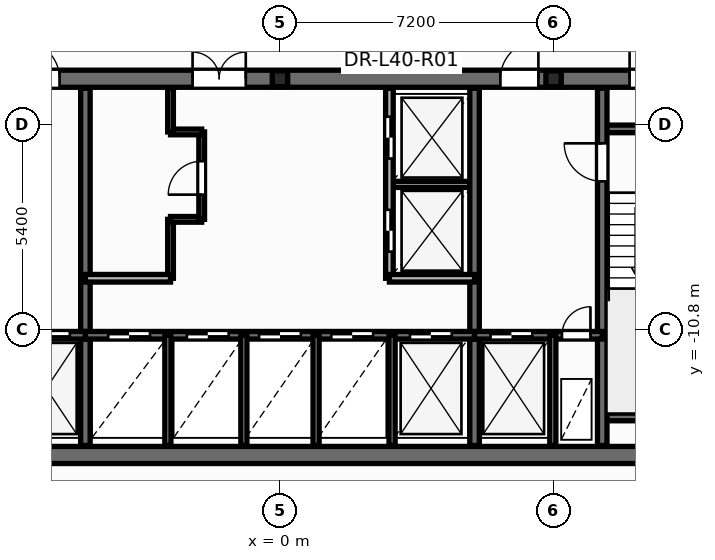
"""IFC4 building model, lengths in metres.
Left out: names, types, materials, properties, quantities, classifications, styles, units other than length and angle.
Written with IfcOpenShell. Run it as: python <this file> out.ifc"""

import sys

from ifc_helpers import new_model, si_unit, direction, frame, frame_2d, origin, origin_2d, place, context, subcontext, project, spatial, rectangle, i_section, extrude, element, fill, save


model = new_model("IFC4")
c1 = context("Model", 3, precision=1e-05, world=origin(), true_north=direction((0.0, 1.0)))
c2 = subcontext(c1, "Body", "Model", "MODEL_VIEW")
j1 = project(units=[si_unit("LENGTHUNIT", "METRE"), si_unit("PLANEANGLEUNIT", "RADIAN")], contexts=[c1])
p1 = place(None, origin())
s1 = spatial("IfcSite", under=j1, at=p1, CompositionType="ELEMENT")
p2 = place(p1, origin())
s2 = spatial("IfcBuilding", under=s1, at=p2, CompositionType="ELEMENT")
p3 = place(p2, frame((0.0, 0.0, 154.5)))
s3 = spatial("IfcBuildingStorey", under=s2, at=p3, CompositionType="ELEMENT", Elevation=154.5)
for number, where, z_axis, x_axis in (
    (1, (0.0, -4.2, 0.0), (0.0, 0.0, 1.0), (1.0, 0.0, 0.0)),
    (2, (7.2, -4.2, 0.0), (0.0, 0.0, 1.0), (1.0, 0.0, 0.0)),
):
    element("IfcColumn", number, at=place(p3, frame(where, z_axis=z_axis, x_axis=x_axis)), inside=s3, PredefinedType="PILASTER", context=c2, shape_type="SweptSolid", body=[
        extrude(i_section(OverallWidth=0.405, OverallDepth=0.414, WebThickness=0.022, FlangeThickness=0.032, at=origin_2d()), origin(), (0.0, 0.0, 1.0), 3.6),
    ])
p4 = place(p3, frame((-2.88, -9.45, 0.0), z_axis=(0.0, 0.0, 1.0), x_axis=(0.0, 1.0, 0.0)))
e3 = element("IfcWall", 3, at=p4, inside=s3, PredefinedType="PARTITIONING", context=c2, shape_type="SweptSolid", body=[
    extrude(rectangle(XDim=1.55, YDim=0.15, at=frame_2d((0.775, 0.0))), origin(), (0.0, 0.0, 1.0), 3.35),
])
p5 = place(p3, frame((-2.88, -7.9, 0.0), z_axis=(0.0, 0.0, 1.0), x_axis=(1.0, 0.0, 0.0)))
e4 = element("IfcWall", 4, at=p5, inside=s3, PredefinedType="PARTITIONING", context=c2, shape_type="SweptSolid", body=[
    extrude(rectangle(XDim=0.82, YDim=0.15, at=frame_2d((0.41, 0.0))), origin(), (0.0, 0.0, 1.0), 3.35),
])
p6 = place(p3, frame((-2.06, -7.9, 0.0), z_axis=(0.0, 0.0, 1.0), x_axis=(0.0, 1.0, 0.0)))
e5 = element("IfcWall", 5, at=p6, inside=s3, PredefinedType="PARTITIONING", context=c2, shape_type="SweptSolid", body=[
    extrude(rectangle(XDim=2.3, YDim=0.15, at=frame_2d((1.15, 0.0))), origin(), (0.0, 0.0, 1.0), 3.35),
])
p7 = place(p6, frame((0.65, 0.0, 0.0)))
e6 = element("IfcOpeningElement", 6, at=p7, cuts=e5, PredefinedType="OPENING", context=c2, shape_type="SweptSolid", body=[
    extrude(rectangle(XDim=0.886, YDim=2.104, at=frame_2d((0.44, 1.052))), frame((0.0, 0.085, 0.0), z_axis=(0.0, -1.0, 0.0), x_axis=(1.0, 0.0, 0.0)), (0.0, 0.0, 1.0), 0.17),
])
p8 = place(p3, frame((-2.88, -5.6, 0.0), z_axis=(0.0, 0.0, 1.0), x_axis=(1.0, 0.0, 0.0)))
e7 = element("IfcWall", 7, at=p8, inside=s3, PredefinedType="PARTITIONING", context=c2, shape_type="SweptSolid", body=[
    extrude(rectangle(XDim=0.82, YDim=0.15, at=frame_2d((0.41, 0.0))), origin(), (0.0, 0.0, 1.0), 3.35),
])
p9 = place(p3, frame((-2.88, -5.6, 0.0), z_axis=(0.0, 0.0, 1.0), x_axis=(0.0, 1.0, 0.0)))
e8 = element("IfcWall", 8, at=p9, inside=s3, PredefinedType="PARTITIONING", context=c2, shape_type="SweptSolid", body=[
    extrude(rectangle(XDim=1.15, YDim=0.15, at=frame_2d((0.575, 0.0))), origin(), (0.0, 0.0, 1.0), 3.35),
])
p10 = place(p3, frame((2.88, -6.98, 0.0), z_axis=(0.0, 0.0, 1.0), x_axis=(1.0, 0.0, 0.0)))
e9 = element("IfcWall", 9, at=p10, inside=s3, PredefinedType="PARTITIONING", context=c2, shape_type="SweptSolid", body=[
    extrude(rectangle(XDim=2.24, YDim=0.16, at=frame_2d((1.12, 0.0))), origin(), (0.0, 0.0, 1.0), 3.35),
])
p11 = place(p3, frame((-12.65, -14.1, 0.0), z_axis=(0.0, 0.0, 1.0), x_axis=(1.0, 0.0, 0.0)))
e10 = element("IfcWall", 10, at=p11, inside=s3, PredefinedType="SHEAR", context=c2, shape_type="SweptSolid", body=[
    extrude(rectangle(XDim=25.3, YDim=0.45, at=frame_2d((12.65, 0.0))), origin(), (0.0, 0.0, 1.0), 3.6),
])
p12 = place(p3, frame((-12.65, -4.2, 0.0), z_axis=(0.0, 0.0, 1.0), x_axis=(1.0, 0.0, 0.0)))
e11 = element("IfcWall", 11, at=p12, inside=s3, PredefinedType="SHEAR", context=c2, shape_type="SweptSolid", body=[
    extrude(rectangle(XDim=25.3, YDim=0.45, at=frame_2d((12.65, 0.0))), origin(), (0.0, 0.0, 1.0), 3.6),
])
p13 = place(p12, frame((1.85, 0.0, 0.0)))
e12 = element("IfcOpeningElement", 12, at=p13, cuts=e11, PredefinedType="OPENING", context=c2, shape_type="SweptSolid", body=[
    extrude(rectangle(XDim=0.756, YDim=2.054, at=frame_2d((0.375, 1.027))), frame((0.0, 0.235, 0.0), z_axis=(0.0, -1.0, 0.0), x_axis=(1.0, 0.0, 0.0)), (0.0, 0.0, 1.0), 0.47),
])
p14 = place(p12, frame((21.85, 0.0, 0.0)))
e13 = element("IfcOpeningElement", 13, at=p14, cuts=e11, PredefinedType="OPENING", context=c2, shape_type="SweptSolid", body=[
    extrude(rectangle(XDim=0.756, YDim=2.054, at=frame_2d((0.375, 1.027))), frame((0.0, 0.235, 0.0), z_axis=(0.0, -1.0, 0.0), x_axis=(1.0, 0.0, 0.0)), (0.0, 0.0, 1.0), 0.47),
])
p15 = place(p12, frame((23.5, 0.0, 0.0)))
e14 = element("IfcOpeningElement", 14, at=p15, cuts=e11, PredefinedType="OPENING", context=c2, shape_type="SweptSolid", body=[
    extrude(rectangle(XDim=0.756, YDim=2.054, at=frame_2d((0.375, 1.027))), frame((0.0, 0.235, 0.0), z_axis=(0.0, -1.0, 0.0), x_axis=(1.0, 0.0, 0.0)), (0.0, 0.0, 1.0), 0.47),
])
p16 = place(p12, frame((5.85, 0.0, 0.0)))
e15 = element("IfcOpeningElement", 15, at=p16, cuts=e11, PredefinedType="OPENING", context=c2, shape_type="SweptSolid", body=[
    extrude(rectangle(XDim=1.006, YDim=2.104, at=frame_2d((0.5, 1.052))), frame((0.0, 0.235, 0.0), z_axis=(0.0, -1.0, 0.0), x_axis=(1.0, 0.0, 0.0)), (0.0, 0.0, 1.0), 0.47),
])
p17 = place(p12, frame((10.35, 0.0, 0.0)))
e16 = element("IfcOpeningElement", 16, at=p17, cuts=e11, PredefinedType="OPENING", context=c2, shape_type="SweptSolid", body=[
    extrude(rectangle(XDim=1.406, YDim=2.154, at=frame_2d((0.7, 1.077))), frame((0.0, 0.235, 0.0), z_axis=(0.0, -1.0, 0.0), x_axis=(1.0, 0.0, 0.0)), (0.0, 0.0, 1.0), 0.47),
])
p18 = place(p12, frame((18.45, 0.0, 0.0)))
e17 = element("IfcOpeningElement", 17, at=p18, cuts=e11, PredefinedType="OPENING", context=c2, shape_type="SweptSolid", body=[
    extrude(rectangle(XDim=1.006, YDim=2.104, at=frame_2d((0.5, 1.052))), frame((0.0, 0.235, 0.0), z_axis=(0.0, -1.0, 0.0), x_axis=(1.0, 0.0, 0.0)), (0.0, 0.0, 1.0), 0.47),
])
for number, where, z_axis, x_axis in (
    (18, (8.48, -5.52, 0.0), (0.0, 0.0, 1.0), (1.0, 0.0, 0.0)),
    (19, (8.48, -13.1, 0.0), (0.0, 0.0, 1.0), (1.0, 0.0, 0.0)),
):
    element("IfcWall", number, at=place(p3, frame(where, z_axis=z_axis, x_axis=x_axis)), inside=s3, PredefinedType="SOLIDWALL", context=c2, shape_type="SweptSolid", body=[
        extrude(rectangle(XDim=3.87, YDim=0.2, at=frame_2d((1.935, 0.0))), origin(), (0.0, 0.0, 1.0), 3.6),
    ])
p19 = place(p3, frame((8.48, -13.85, 0.0), z_axis=(0.0, 0.0, 1.0), x_axis=(0.0, 1.0, 0.0)))
e20 = element("IfcWall", 20, at=p19, inside=s3, PredefinedType="SHEAR", context=c2, shape_type="SweptSolid", body=[
    extrude(rectangle(XDim=9.4, YDim=0.25, at=frame_2d((4.7, 0.0))), origin(), (0.0, 0.0, 1.0), 3.6),
])
p20 = place(p19, frame((6.95, 0.0, 0.0)))
e21 = element("IfcOpeningElement", 21, at=p20, cuts=e20, PredefinedType="OPENING", context=c2, shape_type="SweptSolid", body=[
    extrude(rectangle(XDim=1.006, YDim=2.104, at=frame_2d((0.5, 1.052))), frame((0.0, 0.135, 0.0), z_axis=(0.0, -1.0, 0.0), x_axis=(1.0, 0.0, 0.0)), (0.0, 0.0, 1.0), 0.27),
])
for number, where, z_axis, x_axis in (
    (22, (-5.12, -13.85, 0.0), (0.0, 0.0, 1.0), (0.0, 1.0, 0.0)),
    (23, (5.12, -13.85, 0.0), (0.0, 0.0, 1.0), (0.0, 1.0, 0.0)),
):
    element("IfcWall", number, at=place(p3, frame(where, z_axis=z_axis, x_axis=x_axis)), inside=s3, PredefinedType="SHEAR", context=c2, shape_type="SweptSolid", body=[
        extrude(rectangle(XDim=9.4, YDim=0.25, at=frame_2d((4.7, 0.0))), origin(), (0.0, 0.0, 1.0), 3.6),
    ])
p21 = place(p3, frame((-8.48, -10.95, 0.0), z_axis=(0.0, 0.0, 1.0), x_axis=(1.0, 0.0, 0.0)))
e24 = element("IfcWall", 24, at=p21, inside=s3, PredefinedType="SOLIDWALL", context=c2, shape_type="SweptSolid", body=[
    extrude(rectangle(XDim=3.36, YDim=0.2, at=frame_2d((1.68, 0.0))), origin(), (0.0, 0.0, 1.0), 3.6),
])
p22 = place(p21, frame((0.28, 0.0, 0.0)))
e25 = element("IfcOpeningElement", 25, at=p22, cuts=e24, PredefinedType="OPENING", context=c2, shape_type="SweptSolid", body=[
    extrude(rectangle(XDim=0.756, YDim=2.054, at=frame_2d((0.375, 1.027))), frame((0.0, 0.11, 0.0), z_axis=(0.0, -1.0, 0.0), x_axis=(1.0, 0.0, 0.0)), (0.0, 0.0, 1.0), 0.22),
])
p23 = place(p21, frame((1.85, 0.0, 0.0)))
e26 = element("IfcOpeningElement", 26, at=p23, cuts=e24, PredefinedType="OPENING", context=c2, shape_type="SweptSolid", body=[
    extrude(rectangle(XDim=1.106, YDim=2.104, at=frame_2d((0.55, 1.052))), frame((0.0, 0.11, 0.0), z_axis=(0.0, -1.0, 0.0), x_axis=(1.0, 0.0, 0.0)), (0.0, 0.0, 1.0), 0.22),
])
p24 = place(p3, frame((-5.12, -10.95, 0.0), z_axis=(0.0, 0.0, 1.0), x_axis=(1.0, 0.0, 0.0)))
e27 = element("IfcWall", 27, at=p24, inside=s3, PredefinedType="SOLIDWALL", context=c2, shape_type="SweptSolid", body=[
    extrude(rectangle(XDim=10.24, YDim=0.2, at=frame_2d((5.12, 0.0))), origin(), (0.0, 0.0, 1.0), 3.6),
])
p25 = place(p24, frame((0.6, 0.0, 0.0)))
e28 = element("IfcOpeningElement", 28, at=p25, cuts=e27, PredefinedType="OPENING", context=c2, shape_type="SweptSolid", body=[
    extrude(rectangle(XDim=1.106, YDim=2.104, at=frame_2d((0.55, 1.052))), frame((0.0, 0.11, 0.0), z_axis=(0.0, -1.0, 0.0), x_axis=(1.0, 0.0, 0.0)), (0.0, 0.0, 1.0), 0.22),
])
p26 = place(p24, frame((2.67, 0.0, 0.0)))
e29 = element("IfcOpeningElement", 29, at=p26, cuts=e27, PredefinedType="OPENING", context=c2, shape_type="SweptSolid", body=[
    extrude(rectangle(XDim=1.106, YDim=2.104, at=frame_2d((0.55, 1.052))), frame((0.0, 0.11, 0.0), z_axis=(0.0, -1.0, 0.0), x_axis=(1.0, 0.0, 0.0)), (0.0, 0.0, 1.0), 0.22),
])
p27 = place(p24, frame((4.57, 0.0, 0.0)))
e30 = element("IfcOpeningElement", 30, at=p27, cuts=e27, PredefinedType="OPENING", context=c2, shape_type="SweptSolid", body=[
    extrude(rectangle(XDim=1.106, YDim=2.104, at=frame_2d((0.55, 1.052))), frame((0.0, 0.11, 0.0), z_axis=(0.0, -1.0, 0.0), x_axis=(1.0, 0.0, 0.0)), (0.0, 0.0, 1.0), 0.22),
])
p28 = place(p24, frame((6.47, 0.0, 0.0)))
e31 = element("IfcOpeningElement", 31, at=p28, cuts=e27, PredefinedType="OPENING", context=c2, shape_type="SweptSolid", body=[
    extrude(rectangle(XDim=1.106, YDim=2.104, at=frame_2d((0.55, 1.052))), frame((0.0, 0.11, 0.0), z_axis=(0.0, -1.0, 0.0), x_axis=(1.0, 0.0, 0.0)), (0.0, 0.0, 1.0), 0.22),
])
p29 = place(p24, frame((8.54, 0.0, 0.0)))
e32 = element("IfcOpeningElement", 32, at=p29, cuts=e27, PredefinedType="OPENING", context=c2, shape_type="SweptSolid", body=[
    extrude(rectangle(XDim=1.106, YDim=2.104, at=frame_2d((0.55, 1.052))), frame((0.0, 0.11, 0.0), z_axis=(0.0, -1.0, 0.0), x_axis=(1.0, 0.0, 0.0)), (0.0, 0.0, 1.0), 0.22),
])
p30 = place(p3, frame((5.12, -10.95, 0.0), z_axis=(0.0, 0.0, 1.0), x_axis=(1.0, 0.0, 0.0)))
e33 = element("IfcWall", 33, at=p30, inside=s3, PredefinedType="SOLIDWALL", context=c2, shape_type="SweptSolid", body=[
    extrude(rectangle(XDim=3.36, YDim=0.2, at=frame_2d((1.68, 0.0))), origin(), (0.0, 0.0, 1.0), 3.6),
])
p31 = place(p30, frame((0.42, 0.0, 0.0)))
e34 = element("IfcOpeningElement", 34, at=p31, cuts=e33, PredefinedType="OPENING", context=c2, shape_type="SweptSolid", body=[
    extrude(rectangle(XDim=1.106, YDim=2.104, at=frame_2d((0.55, 1.052))), frame((0.0, 0.11, 0.0), z_axis=(0.0, -1.0, 0.0), x_axis=(1.0, 0.0, 0.0)), (0.0, 0.0, 1.0), 0.22),
])
p32 = place(p30, frame((2.3, 0.0, 0.0)))
e35 = element("IfcOpeningElement", 35, at=p32, cuts=e33, PredefinedType="OPENING", context=c2, shape_type="SweptSolid", body=[
    extrude(rectangle(XDim=0.756, YDim=2.054, at=frame_2d((0.375, 1.027))), frame((0.0, 0.11, 0.0), z_axis=(0.0, -1.0, 0.0), x_axis=(1.0, 0.0, 0.0)), (0.0, 0.0, 1.0), 0.22),
])
for number, where, z_axis, x_axis in (
    (36, (7.18, -13.85, 0.0), (0.0, 0.0, 1.0), (0.0, 1.0, 0.0)),
    (37, (-2.95, -13.85, 0.0), (0.0, 0.0, 1.0), (0.0, 1.0, 0.0)),
    (38, (2.95, -13.85, 0.0), (0.0, 0.0, 1.0), (0.0, 1.0, 0.0)),
):
    element("IfcWall", number, at=place(p3, frame(where, z_axis=z_axis, x_axis=x_axis)), inside=s3, PredefinedType="PARTITIONING", context=c2, shape_type="SweptSolid", body=[
        extrude(rectangle(XDim=2.9, YDim=0.16, at=frame_2d((1.45, 0.0))), origin(), (0.0, 0.0, 1.0), 2.475),
    ])
p33 = place(p3, frame((-5.12, -9.45, 0.0), z_axis=(0.0, 0.0, 1.0), x_axis=(1.0, 0.0, 0.0)))
e39 = element("IfcWall", 39, at=p33, inside=s3, PredefinedType="SOLIDWALL", context=c2, shape_type="SweptSolid", body=[
    extrude(rectangle(XDim=2.24, YDim=0.2, at=frame_2d((1.12, 0.0))), origin(), (0.0, 0.0, 1.0), 3.35),
])
p34 = place(p3, frame((2.88, -9.45, 0.0), z_axis=(0.0, 0.0, 1.0), x_axis=(0.0, 1.0, 0.0)))
e40 = element("IfcWall", 40, at=p34, inside=s3, PredefinedType="SOLIDWALL", context=c2, shape_type="SweptSolid", body=[
    extrude(rectangle(XDim=5.0, YDim=0.2, at=frame_2d((2.5, 0.0))), origin(), (0.0, 0.0, 1.0), 3.35),
])
p35 = place(p34, frame((0.7, 0.0, 0.0)))
e41 = element("IfcOpeningElement", 41, at=p35, cuts=e40, PredefinedType="OPENING", context=c2, shape_type="SweptSolid", body=[
    extrude(rectangle(XDim=1.106, YDim=2.104, at=frame_2d((0.55, 1.052))), frame((0.0, 0.11, 0.0), z_axis=(0.0, -1.0, 0.0), x_axis=(1.0, 0.0, 0.0)), (0.0, 0.0, 1.0), 0.22),
])
p36 = place(p34, frame((3.15, 0.0, 0.0)))
e42 = element("IfcOpeningElement", 42, at=p36, cuts=e40, PredefinedType="OPENING", context=c2, shape_type="SweptSolid", body=[
    extrude(rectangle(XDim=1.106, YDim=2.104, at=frame_2d((0.55, 1.052))), frame((0.0, 0.11, 0.0), z_axis=(0.0, -1.0, 0.0), x_axis=(1.0, 0.0, 0.0)), (0.0, 0.0, 1.0), 0.22),
])
p37 = place(p3, frame((2.88, -9.45, 0.0), z_axis=(0.0, 0.0, 1.0), x_axis=(1.0, 0.0, 0.0)))
e43 = element("IfcWall", 43, at=p37, inside=s3, PredefinedType="SOLIDWALL", context=c2, shape_type="SweptSolid", body=[
    extrude(rectangle(XDim=2.24, YDim=0.2, at=frame_2d((1.12, 0.0))), origin(), (0.0, 0.0, 1.0), 3.35),
])
for number, where, z_axis, x_axis in (
    (44, (-0.95, -13.85, 0.0), (0.0, 0.0, 1.0), (0.0, 1.0, 0.0)),
    (45, (0.95, -13.85, 0.0), (0.0, 0.0, 1.0), (0.0, 1.0, 0.0)),
):
    element("IfcWall", number, at=place(p3, frame(where, z_axis=z_axis, x_axis=x_axis)), inside=s3, PredefinedType="PARTITIONING", context=c2, shape_type="SweptSolid", body=[
        extrude(rectangle(XDim=2.9, YDim=0.16, at=frame_2d((1.45, 0.0))), origin(), (0.0, 0.0, 1.0), 2.475),
    ])
p38 = place(p7, origin())
e46 = element("IfcDoor", 46, at=p38, inside=s3, OperationType="SINGLE_SWING_LEFT", PredefinedType="DOOR", context=c2, shape_type="SweptSolid", body=[
    extrude(rectangle(XDim=0.88, YDim=2.1, at=frame_2d((0.44, 1.05))), frame((0.0, 0.025, 0.0), z_axis=(0.0, -1.0, 0.0), x_axis=(1.0, 0.0, 0.0)), (0.0, 0.0, 1.0), 0.05),
])
fill(e6, e46)
p39 = place(p35, origin())
e47 = element("IfcDoor", 47, at=p39, inside=s3, OperationType="DOUBLE_DOOR_SLIDING", PredefinedType="DOOR", context=c2, shape_type="SweptSolid", body=[
    extrude(rectangle(XDim=1.1, YDim=2.1, at=frame_2d((0.55, 1.05))), frame((0.0, 0.025, 0.0), z_axis=(0.0, -1.0, 0.0), x_axis=(1.0, 0.0, 0.0)), (0.0, 0.0, 1.0), 0.05),
])
fill(e41, e47)
p40 = place(p36, origin())
e48 = element("IfcDoor", 48, at=p40, inside=s3, OperationType="DOUBLE_DOOR_SLIDING", PredefinedType="DOOR", context=c2, shape_type="SweptSolid", body=[
    extrude(rectangle(XDim=1.1, YDim=2.1, at=frame_2d((0.55, 1.05))), frame((0.0, 0.025, 0.0), z_axis=(0.0, -1.0, 0.0), x_axis=(1.0, 0.0, 0.0)), (0.0, 0.0, 1.0), 0.05),
])
fill(e42, e48)
p41 = place(p20, origin())
e49 = element("IfcDoor", 49, at=p41, inside=s3, OperationType="SINGLE_SWING_RIGHT", PredefinedType="DOOR", context=c2, shape_type="SweptSolid", body=[
    extrude(rectangle(XDim=1.0, YDim=2.1, at=frame_2d((0.5, 1.05))), frame((0.0, 0.025, 0.0), z_axis=(0.0, -1.0, 0.0), x_axis=(1.0, 0.0, 0.0)), (0.0, 0.0, 1.0), 0.05),
])
fill(e21, e49)
p42 = place(p23, origin())
e50 = element("IfcDoor", 50, at=p42, inside=s3, OperationType="DOUBLE_DOOR_SLIDING", PredefinedType="DOOR", context=c2, shape_type="SweptSolid", body=[
    extrude(rectangle(XDim=1.1, YDim=2.1, at=frame_2d((0.55, 1.05))), frame((0.0, 0.025, 0.0), z_axis=(0.0, -1.0, 0.0), x_axis=(1.0, 0.0, 0.0)), (0.0, 0.0, 1.0), 0.05),
])
fill(e26, e50)
p43 = place(p31, origin())
e51 = element("IfcDoor", 51, at=p43, inside=s3, OperationType="DOUBLE_DOOR_SLIDING", PredefinedType="DOOR", context=c2, shape_type="SweptSolid", body=[
    extrude(rectangle(XDim=1.1, YDim=2.1, at=frame_2d((0.55, 1.05))), frame((0.0, 0.025, 0.0), z_axis=(0.0, -1.0, 0.0), x_axis=(1.0, 0.0, 0.0)), (0.0, 0.0, 1.0), 0.05),
])
fill(e34, e51)
p44 = place(p32, origin())
e52 = element("IfcDoor", 52, at=p44, inside=s3, OperationType="SINGLE_SWING_RIGHT", PredefinedType="DOOR", context=c2, shape_type="SweptSolid", body=[
    extrude(rectangle(XDim=0.75, YDim=2.05, at=frame_2d((0.375, 1.025))), frame((0.0, 0.025, 0.0), z_axis=(0.0, -1.0, 0.0), x_axis=(1.0, 0.0, 0.0)), (0.0, 0.0, 1.0), 0.05),
])
fill(e35, e52)
p45 = place(p25, origin())
e53 = element("IfcDoor", 53, at=p45, inside=s3, OperationType="DOUBLE_DOOR_SLIDING", PredefinedType="DOOR", context=c2, shape_type="SweptSolid", body=[
    extrude(rectangle(XDim=1.1, YDim=2.1, at=frame_2d((0.55, 1.05))), frame((0.0, 0.025, 0.0), z_axis=(0.0, -1.0, 0.0), x_axis=(1.0, 0.0, 0.0)), (0.0, 0.0, 1.0), 0.05),
])
fill(e28, e53)
p46 = place(p26, origin())
e54 = element("IfcDoor", 54, at=p46, inside=s3, OperationType="DOUBLE_DOOR_SLIDING", PredefinedType="DOOR", context=c2, shape_type="SweptSolid", body=[
    extrude(rectangle(XDim=1.1, YDim=2.1, at=frame_2d((0.55, 1.05))), frame((0.0, 0.025, 0.0), z_axis=(0.0, -1.0, 0.0), x_axis=(1.0, 0.0, 0.0)), (0.0, 0.0, 1.0), 0.05),
])
fill(e29, e54)
p47 = place(p27, origin())
e55 = element("IfcDoor", 55, at=p47, inside=s3, OperationType="DOUBLE_DOOR_SLIDING", PredefinedType="DOOR", context=c2, shape_type="SweptSolid", body=[
    extrude(rectangle(XDim=1.1, YDim=2.1, at=frame_2d((0.55, 1.05))), frame((0.0, 0.025, 0.0), z_axis=(0.0, -1.0, 0.0), x_axis=(1.0, 0.0, 0.0)), (0.0, 0.0, 1.0), 0.05),
])
fill(e30, e55)
p48 = place(p28, origin())
e56 = element("IfcDoor", 56, at=p48, inside=s3, OperationType="DOUBLE_DOOR_SLIDING", PredefinedType="DOOR", context=c2, shape_type="SweptSolid", body=[
    extrude(rectangle(XDim=1.1, YDim=2.1, at=frame_2d((0.55, 1.05))), frame((0.0, 0.025, 0.0), z_axis=(0.0, -1.0, 0.0), x_axis=(1.0, 0.0, 0.0)), (0.0, 0.0, 1.0), 0.05),
])
fill(e31, e56)
p49 = place(p29, origin())
e57 = element("IfcDoor", 57, at=p49, inside=s3, OperationType="DOUBLE_DOOR_SLIDING", PredefinedType="DOOR", context=c2, shape_type="SweptSolid", body=[
    extrude(rectangle(XDim=1.1, YDim=2.1, at=frame_2d((0.55, 1.05))), frame((0.0, 0.025, 0.0), z_axis=(0.0, -1.0, 0.0), x_axis=(1.0, 0.0, 0.0)), (0.0, 0.0, 1.0), 0.05),
])
fill(e32, e57)
p50 = place(p14, origin())
e58 = element("IfcDoor", 58, at=p50, inside=s3, OperationType="SINGLE_SWING_LEFT", PredefinedType="DOOR", context=c2, shape_type="SweptSolid", body=[
    extrude(rectangle(XDim=0.75, YDim=2.05, at=frame_2d((0.375, 1.025))), frame((0.0, 0.025, 0.0), z_axis=(0.0, -1.0, 0.0), x_axis=(1.0, 0.0, 0.0)), (0.0, 0.0, 1.0), 0.05),
])
fill(e13, e58)
p51 = place(p16, origin())
e59 = element("IfcDoor", 59, at=p51, inside=s3, OperationType="SINGLE_SWING_LEFT", PredefinedType="DOOR", context=c2, shape_type="SweptSolid", body=[
    extrude(rectangle(XDim=1.0, YDim=2.1, at=frame_2d((0.5, 1.05))), frame((0.0, 0.025, 0.0), z_axis=(0.0, -1.0, 0.0), x_axis=(1.0, 0.0, 0.0)), (0.0, 0.0, 1.0), 0.05),
])
fill(e15, e59)
p52 = place(p17, origin())
e60 = element("IfcDoor", 60, at=p52, inside=s3, OperationType="DOUBLE_DOOR_SINGLE_SWING", PredefinedType="DOOR", context=c2, shape_type="SweptSolid", body=[
    extrude(rectangle(XDim=1.4, YDim=2.15, at=frame_2d((0.7, 1.075))), frame((0.0, 0.025, 0.0), z_axis=(0.0, -1.0, 0.0), x_axis=(1.0, 0.0, 0.0)), (0.0, 0.0, 1.0), 0.05),
])
fill(e16, e60)
p53 = place(p18, origin())
e61 = element("IfcDoor", 61, at=p53, inside=s3, OperationType="SINGLE_SWING_RIGHT", PredefinedType="DOOR", context=c2, shape_type="SweptSolid", body=[
    extrude(rectangle(XDim=1.0, YDim=2.1, at=frame_2d((0.5, 1.05))), frame((0.0, 0.025, 0.0), z_axis=(0.0, -1.0, 0.0), x_axis=(1.0, 0.0, 0.0)), (0.0, 0.0, 1.0), 0.05),
])
fill(e17, e61)
save(model, sys.argv[1])
